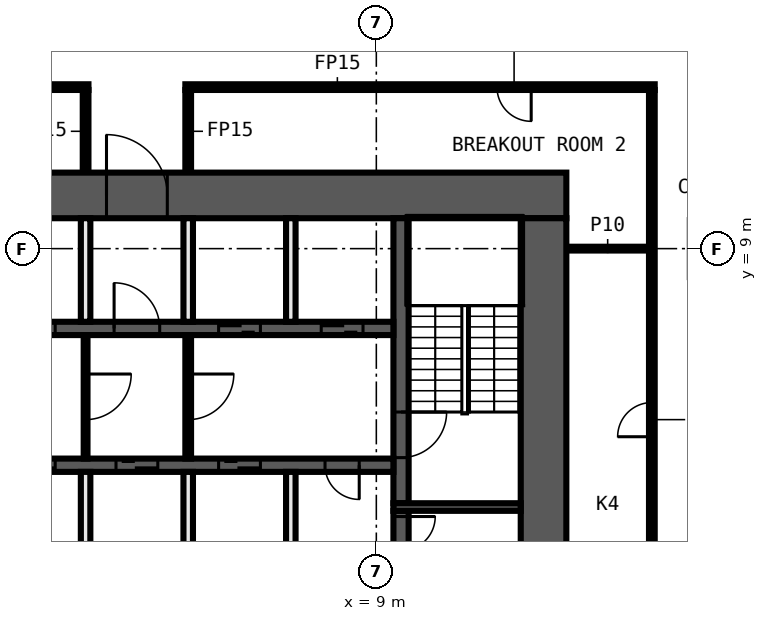
"""IFC4 building model, lengths in metres.
Left out: names, types, materials, properties, quantities, classifications, styles, units other than length and angle.
Written with IfcOpenShell. Run it as: python <this file> out.ifc"""

import sys

from ifc_helpers import new_model, si_unit, direction, frame, frame_2d, origin, place, context, subcontext, project, spatial, rectangle, extrude, element, fill, save


model = new_model("IFC4")
c1 = context("Model", 3, precision=1e-05, world=origin(), true_north=direction((0.0, 1.0)))
c2 = subcontext(c1, "Body", "Model", "MODEL_VIEW")
j1 = project(units=[si_unit("LENGTHUNIT", "METRE"), si_unit("PLANEANGLEUNIT", "RADIAN")], contexts=[c1])
p1 = place(None, origin())
s1 = spatial("IfcSite", under=j1, at=p1, CompositionType="ELEMENT")
p2 = place(p1, origin())
s2 = spatial("IfcBuilding", under=s1, at=p2, CompositionType="ELEMENT")
p3 = place(p2, frame((0.0, 0.0, 77.3)))
s3 = spatial("IfcBuildingStorey", under=s2, at=p3, CompositionType="ELEMENT", Elevation=77.3)
p4 = place(p3, frame((14.0, 9.0, 0.0), z_axis=(0.0, 0.0, 1.0), x_axis=(1.0, 0.0, 0.0)))
e1 = element("IfcWall", 1, at=p4, inside=s3, PredefinedType="PARTITIONING", context=c2, shape_type="SweptSolid", body=[
    extrude(rectangle(XDim=2.175, YDim=0.1, at=frame_2d((1.087, 0.0))), origin(), (0.0, 0.0, 1.0), 3.3),
])
p5 = place(p3, frame((1.425, 13.25, 0.0), z_axis=(0.0, 0.0, 1.0), x_axis=(-1.0, 0.0, 0.0)))
e2 = element("IfcWall", 2, at=p5, inside=s3, PredefinedType="PARTITIONING", context=c2, shape_type="SweptSolid", body=[
    extrude(rectangle(XDim=17.75, YDim=0.15, at=frame_2d((8.875, 0.0))), origin(), (0.0, 0.0, 1.0), 3.3),
])
p6 = place(p5, frame((7.725, 0.0, 0.0)))
e3 = element("IfcOpeningElement", 3, at=p6, cuts=e2, PredefinedType="OPENING", context=c2, shape_type="SweptSolid", body=[
    extrude(rectangle(XDim=0.9, YDim=2.1, at=frame_2d((0.45, 1.05))), frame((0.0, 0.085, 0.0), z_axis=(0.0, -1.0, 0.0), x_axis=(1.0, 0.0, 0.0)), (0.0, 0.0, 1.0), 0.17),
])
p7 = place(p5, frame((13.6, 0.0, 0.0)))
e4 = element("IfcOpeningElement", 4, at=p7, cuts=e2, PredefinedType="OPENING", context=c2, shape_type="SweptSolid", body=[
    extrude(rectangle(XDim=0.9, YDim=2.1, at=frame_2d((0.45, 1.05))), frame((0.0, 0.085, 0.0), z_axis=(0.0, -1.0, 0.0), x_axis=(1.0, 0.0, 0.0)), (0.0, 0.0, 1.0), 0.17),
])
p8 = place(p3, frame((16.325, 13.25, 0.0), z_axis=(0.0, 0.0, 1.0), x_axis=(-1.0, 0.0, 0.0)))
e5 = element("IfcWall", 5, at=p8, inside=s3, PredefinedType="PARTITIONING", context=c2, shape_type="SweptSolid", body=[
    extrude(rectangle(XDim=12.35, YDim=0.15, at=frame_2d((6.175, 0.0))), origin(), (0.0, 0.0, 1.0), 3.3),
])
p9 = place(p8, frame((3.25, 0.0, 0.0)))
e6 = element("IfcOpeningElement", 6, at=p9, cuts=e5, PredefinedType="OPENING", context=c2, shape_type="SweptSolid", body=[
    extrude(rectangle(XDim=0.9, YDim=2.1, at=frame_2d((0.45, 1.05))), frame((0.0, 0.085, 0.0), z_axis=(0.0, -1.0, 0.0), x_axis=(1.0, 0.0, 0.0)), (0.0, 0.0, 1.0), 0.17),
])
p10 = place(p3, frame((16.25, -13.175, 0.0), z_axis=(0.0, 0.0, 1.0), x_axis=(0.0, 1.0, 0.0)))
e7 = element("IfcWall", 7, at=p10, inside=s3, PredefinedType="PARTITIONING", context=c2, shape_type="SweptSolid", body=[
    extrude(rectangle(XDim=26.35, YDim=0.15, at=frame_2d((13.175, 0.0))), origin(), (0.0, 0.0, 1.0), 3.3),
])
p11 = place(p10, frame((17.225, 0.0, 0.0)))
e8 = element("IfcOpeningElement", 8, at=p11, cuts=e7, PredefinedType="OPENING", context=c2, shape_type="SweptSolid", body=[
    extrude(rectangle(XDim=0.9, YDim=2.1, at=frame_2d((0.45, 1.05))), frame((0.0, 0.085, 0.0), z_axis=(0.0, -1.0, 0.0), x_axis=(1.0, 0.0, 0.0)), (0.0, 0.0, 1.0), 0.17),
])
for number, where, z_axis, x_axis in (
    (9, (4.05, 11.0, 0.0), (0.0, 0.0, 1.0), (0.0, 1.0, 0.0)),
    (10, (1.35, 11.0, 0.0), (0.0, 0.0, 1.0), (0.0, 1.0, 0.0)),
):
    element("IfcWall", number, at=place(p3, frame(where, z_axis=z_axis, x_axis=x_axis)), inside=s3, PredefinedType="PARTITIONING", context=c2, shape_type="SweptSolid", body=[
        extrude(rectangle(XDim=2.175, YDim=0.15, at=frame_2d((1.087, 0.0))), origin(), (0.0, 0.0, 1.0), 3.3),
    ])
p12 = place(p3, frame((-14.0, 10.4, 0.0), z_axis=(0.0, 0.0, 1.0), x_axis=(1.0, 0.0, 0.0)))
e11 = element("IfcWall", 11, at=p12, inside=s3, PredefinedType="SHEAR", context=c2, shape_type="SweptSolid", body=[
    extrude(rectangle(XDim=28.0, YDim=1.2, at=frame_2d((14.0, 0.0))), origin(), (0.0, 0.0, 1.0), 3.3),
])
p13 = place(p12, frame((15.9, 0.0, 0.0)))
e12 = element("IfcOpeningElement", 12, at=p13, cuts=e11, PredefinedType="OPENING", context=c2, shape_type="SweptSolid", body=[
    extrude(rectangle(XDim=1.6, YDim=2.1, at=frame_2d((0.8, 1.05))), frame((0.0, 0.61, 0.0), z_axis=(0.0, -1.0, 0.0), x_axis=(1.0, 0.0, 0.0)), (0.0, 0.0, 1.0), 1.22),
])
p14 = place(p3, frame((13.4, 9.8, 0.0), z_axis=(0.0, 0.0, 1.0), x_axis=(0.0, -1.0, 0.0)))
e13 = element("IfcWall", 13, at=p14, inside=s3, PredefinedType="SHEAR", context=c2, shape_type="SweptSolid", body=[
    extrude(rectangle(XDim=19.6, YDim=1.2, at=frame_2d((9.8, 0.0))), origin(), (0.0, 0.0, 1.0), 3.3),
])
p15 = place(p3, frame((9.65, 2.1, 0.0), z_axis=(0.0, 0.0, 1.0), x_axis=(0.0, -1.0, 0.0)))
e14 = element("IfcWall", 14, at=p15, inside=s3, PredefinedType="SHEAR", context=c2, shape_type="SweptSolid", body=[
    extrude(rectangle(XDim=4.2, YDim=0.4, at=frame_2d((2.1, 0.0))), origin(), (0.0, 0.0, 1.0), 3.3),
])
p16 = place(p15, frame((0.15, 0.0, 0.0)))
e15 = element("IfcOpeningElement", 15, at=p16, cuts=e14, PredefinedType="OPENING", context=c2, shape_type="SweptSolid", body=[
    extrude(rectangle(XDim=0.9, YDim=2.1, at=frame_2d((0.45, 1.05))), frame((0.0, 0.21, 0.0), z_axis=(0.0, -1.0, 0.0), x_axis=(1.0, 0.0, 0.0)), (0.0, 0.0, 1.0), 0.42),
])
p17 = place(p3, frame((9.65, 9.8, 0.0), z_axis=(0.0, 0.0, 1.0), x_axis=(0.0, -1.0, 0.0)))
e16 = element("IfcWall", 16, at=p17, inside=s3, PredefinedType="SHEAR", context=c2, shape_type="SweptSolid", body=[
    extrude(rectangle(XDim=7.5, YDim=0.4, at=frame_2d((3.75, 0.0))), origin(), (0.0, 0.0, 1.0), 3.3),
])
p18 = place(p17, frame((5.1, 0.0, 0.0)))
e17 = element("IfcOpeningElement", 17, at=p18, cuts=e16, PredefinedType="OPENING", context=c2, shape_type="SweptSolid", body=[
    extrude(rectangle(XDim=1.2, YDim=2.1, at=frame_2d((0.6, 1.05))), frame((0.0, 0.21, 0.0), z_axis=(0.0, -1.0, 0.0), x_axis=(1.0, 0.0, 0.0)), (0.0, 0.0, 1.0), 0.42),
])
p19 = place(p3, frame((9.45, 2.2, 0.0), z_axis=(0.0, 0.0, 1.0), x_axis=(1.0, 0.0, 0.0)))
e18 = element("IfcWall", 18, at=p19, inside=s3, PredefinedType="SHEAR", context=c2, shape_type="SweptSolid", body=[
    extrude(rectangle(XDim=3.35, YDim=0.2, at=frame_2d((1.675, 0.0))), origin(), (0.0, 0.0, 1.0), 3.3),
])
p20 = place(p3, frame((-9.45, 6.9, 0.0), z_axis=(0.0, 0.0, 1.0), x_axis=(1.0, 0.0, 0.0)))
e19 = element("IfcWall", 19, at=p20, inside=s3, PredefinedType="SHEAR", context=c2, shape_type="SweptSolid", body=[
    extrude(rectangle(XDim=18.9, YDim=0.35, at=frame_2d((9.45, 0.0))), origin(), (0.0, 0.0, 1.0), 3.3),
])
p21 = place(p20, frame((0.8, 0.0, 0.0)))
e20 = element("IfcOpeningElement", 20, at=p21, cuts=e19, PredefinedType="OPENING", context=c2, shape_type="SweptSolid", body=[
    extrude(rectangle(XDim=1.1, YDim=2.1, at=frame_2d((0.55, 1.05))), frame((0.0, 0.185, 0.0), z_axis=(0.0, -1.0, 0.0), x_axis=(1.0, 0.0, 0.0)), (0.0, 0.0, 1.0), 0.37),
])
p22 = place(p20, frame((3.5, 0.0, 0.0)))
e21 = element("IfcOpeningElement", 21, at=p22, cuts=e19, PredefinedType="OPENING", context=c2, shape_type="SweptSolid", body=[
    extrude(rectangle(XDim=1.1, YDim=2.1, at=frame_2d((0.55, 1.05))), frame((0.0, 0.185, 0.0), z_axis=(0.0, -1.0, 0.0), x_axis=(1.0, 0.0, 0.0)), (0.0, 0.0, 1.0), 0.37),
])
p23 = place(p20, frame((6.2, 0.0, 0.0)))
e22 = element("IfcOpeningElement", 22, at=p23, cuts=e19, PredefinedType="OPENING", context=c2, shape_type="SweptSolid", body=[
    extrude(rectangle(XDim=1.1, YDim=2.1, at=frame_2d((0.55, 1.05))), frame((0.0, 0.185, 0.0), z_axis=(0.0, -1.0, 0.0), x_axis=(1.0, 0.0, 0.0)), (0.0, 0.0, 1.0), 0.37),
])
p24 = place(p20, frame((8.9, 0.0, 0.0)))
e23 = element("IfcOpeningElement", 23, at=p24, cuts=e19, PredefinedType="OPENING", context=c2, shape_type="SweptSolid", body=[
    extrude(rectangle(XDim=1.1, YDim=2.1, at=frame_2d((0.55, 1.05))), frame((0.0, 0.185, 0.0), z_axis=(0.0, -1.0, 0.0), x_axis=(1.0, 0.0, 0.0)), (0.0, 0.0, 1.0), 0.37),
])
p25 = place(p20, frame((11.55, 0.0, 0.0)))
e24 = element("IfcOpeningElement", 24, at=p25, cuts=e19, PredefinedType="OPENING", context=c2, shape_type="SweptSolid", body=[
    extrude(rectangle(XDim=1.2, YDim=2.1, at=frame_2d((0.6, 1.05))), frame((0.0, 0.185, 0.0), z_axis=(0.0, -1.0, 0.0), x_axis=(1.0, 0.0, 0.0)), (0.0, 0.0, 1.0), 0.37),
])
p26 = place(p20, frame((14.3, 0.0, 0.0)))
e25 = element("IfcOpeningElement", 25, at=p26, cuts=e19, PredefinedType="OPENING", context=c2, shape_type="SweptSolid", body=[
    extrude(rectangle(XDim=1.1, YDim=2.1, at=frame_2d((0.55, 1.05))), frame((0.0, 0.185, 0.0), z_axis=(0.0, -1.0, 0.0), x_axis=(1.0, 0.0, 0.0)), (0.0, 0.0, 1.0), 0.37),
])
p27 = place(p20, frame((17.0, 0.0, 0.0)))
e26 = element("IfcOpeningElement", 26, at=p27, cuts=e19, PredefinedType="OPENING", context=c2, shape_type="SweptSolid", body=[
    extrude(rectangle(XDim=1.1, YDim=2.1, at=frame_2d((0.55, 1.05))), frame((0.0, 0.185, 0.0), z_axis=(0.0, -1.0, 0.0), x_axis=(1.0, 0.0, 0.0)), (0.0, 0.0, 1.0), 0.37),
])
p28 = place(p3, frame((9.45, 3.3, 0.0), z_axis=(0.0, 0.0, 1.0), x_axis=(-1.0, 0.0, 0.0)))
e27 = element("IfcWall", 27, at=p28, inside=s3, PredefinedType="SHEAR", context=c2, shape_type="SweptSolid", body=[
    extrude(rectangle(XDim=18.9, YDim=0.35, at=frame_2d((9.45, 0.0))), origin(), (0.0, 0.0, 1.0), 3.3),
])
p29 = place(p28, frame((17.0, 0.0, 0.0)))
e28 = element("IfcOpeningElement", 28, at=p29, cuts=e27, PredefinedType="OPENING", context=c2, shape_type="SweptSolid", body=[
    extrude(rectangle(XDim=1.1, YDim=2.1, at=frame_2d((0.55, 1.05))), frame((0.0, 0.185, 0.0), z_axis=(0.0, -1.0, 0.0), x_axis=(1.0, 0.0, 0.0)), (0.0, 0.0, 1.0), 0.37),
])
p30 = place(p28, frame((14.3, 0.0, 0.0)))
e29 = element("IfcOpeningElement", 29, at=p30, cuts=e27, PredefinedType="OPENING", context=c2, shape_type="SweptSolid", body=[
    extrude(rectangle(XDim=1.1, YDim=2.1, at=frame_2d((0.55, 1.05))), frame((0.0, 0.185, 0.0), z_axis=(0.0, -1.0, 0.0), x_axis=(1.0, 0.0, 0.0)), (0.0, 0.0, 1.0), 0.37),
])
p31 = place(p28, frame((11.6, 0.0, 0.0)))
e30 = element("IfcOpeningElement", 30, at=p31, cuts=e27, PredefinedType="OPENING", context=c2, shape_type="SweptSolid", body=[
    extrude(rectangle(XDim=1.1, YDim=2.1, at=frame_2d((0.55, 1.05))), frame((0.0, 0.185, 0.0), z_axis=(0.0, -1.0, 0.0), x_axis=(1.0, 0.0, 0.0)), (0.0, 0.0, 1.0), 0.37),
])
p32 = place(p28, frame((8.9, 0.0, 0.0)))
e31 = element("IfcOpeningElement", 31, at=p32, cuts=e27, PredefinedType="OPENING", context=c2, shape_type="SweptSolid", body=[
    extrude(rectangle(XDim=1.1, YDim=2.1, at=frame_2d((0.55, 1.05))), frame((0.0, 0.185, 0.0), z_axis=(0.0, -1.0, 0.0), x_axis=(1.0, 0.0, 0.0)), (0.0, 0.0, 1.0), 0.37),
])
p33 = place(p28, frame((6.2, 0.0, 0.0)))
e32 = element("IfcOpeningElement", 32, at=p33, cuts=e27, PredefinedType="OPENING", context=c2, shape_type="SweptSolid", body=[
    extrude(rectangle(XDim=1.1, YDim=2.1, at=frame_2d((0.55, 1.05))), frame((0.0, 0.185, 0.0), z_axis=(0.0, -1.0, 0.0), x_axis=(1.0, 0.0, 0.0)), (0.0, 0.0, 1.0), 0.37),
])
p34 = place(p28, frame((3.5, 0.0, 0.0)))
e33 = element("IfcOpeningElement", 33, at=p34, cuts=e27, PredefinedType="OPENING", context=c2, shape_type="SweptSolid", body=[
    extrude(rectangle(XDim=1.1, YDim=2.1, at=frame_2d((0.55, 1.05))), frame((0.0, 0.185, 0.0), z_axis=(0.0, -1.0, 0.0), x_axis=(1.0, 0.0, 0.0)), (0.0, 0.0, 1.0), 0.37),
])
p35 = place(p28, frame((0.9, 0.0, 0.0)))
e34 = element("IfcOpeningElement", 34, at=p35, cuts=e27, PredefinedType="OPENING", context=c2, shape_type="SweptSolid", body=[
    extrude(rectangle(XDim=0.9, YDim=2.1, at=frame_2d((0.45, 1.05))), frame((0.0, 0.185, 0.0), z_axis=(0.0, -1.0, 0.0), x_axis=(1.0, 0.0, 0.0)), (0.0, 0.0, 1.0), 0.37),
])
for number, where, z_axis, x_axis in (
    (35, (6.75, 0.4, 0.0), (0.0, 0.0, 1.0), (0.0, 1.0, 0.0)),
    (36, (6.75, 7.075, 0.0), (0.0, 0.0, 1.0), (0.0, 1.0, 0.0)),
):
    element("IfcWall", number, at=place(p3, frame(where, z_axis=z_axis, x_axis=x_axis)), inside=s3, PredefinedType="SOLIDWALL", context=c2, shape_type="SweptSolid", body=[
        extrude(rectangle(XDim=2.725, YDim=0.25, at=frame_2d((1.363, 0.0))), origin(), (0.0, 0.0, 1.0), 3.3),
    ])
p36 = place(p3, frame((4.05, 6.725, 0.0), z_axis=(0.0, 0.0, 1.0), x_axis=(0.0, -1.0, 0.0)))
e37 = element("IfcWall", 37, at=p36, inside=s3, PredefinedType="PARTITIONING", context=c2, shape_type="SweptSolid", body=[
    extrude(rectangle(XDim=3.25, YDim=0.15, at=frame_2d((1.625, 0.0))), origin(), (0.0, 0.0, 1.0), 3.3),
])
p37 = place(p36, frame((1.025, 0.0, 0.0)))
e38 = element("IfcOpeningElement", 38, at=p37, cuts=e37, PredefinedType="OPENING", context=c2, shape_type="SweptSolid", body=[
    extrude(rectangle(XDim=1.2, YDim=2.1, at=frame_2d((0.6, 1.05))), frame((0.0, 0.085, 0.0), z_axis=(0.0, -1.0, 0.0), x_axis=(1.0, 0.0, 0.0)), (0.0, 0.0, 1.0), 0.17),
])
for number, where, z_axis, x_axis in (
    (39, (4.05, 0.4, 0.0), (0.0, 0.0, 1.0), (0.0, 1.0, 0.0)),
    (40, (4.05, 7.075, 0.0), (0.0, 0.0, 1.0), (0.0, 1.0, 0.0)),
):
    element("IfcWall", number, at=place(p3, frame(where, z_axis=z_axis, x_axis=x_axis)), inside=s3, PredefinedType="SOLIDWALL", context=c2, shape_type="SweptSolid", body=[
        extrude(rectangle(XDim=2.725, YDim=0.25, at=frame_2d((1.363, 0.0))), origin(), (0.0, 0.0, 1.0), 3.3),
    ])
p38 = place(p3, frame((1.35, 6.725, 0.0), z_axis=(0.0, 0.0, 1.0), x_axis=(0.0, -1.0, 0.0)))
e41 = element("IfcWall", 41, at=p38, inside=s3, PredefinedType="PARTITIONING", context=c2, shape_type="SweptSolid", body=[
    extrude(rectangle(XDim=3.25, YDim=0.1, at=frame_2d((1.625, 0.0))), origin(), (0.0, 0.0, 1.0), 3.3),
])
p39 = place(p38, frame((1.025, 0.0, 0.0)))
e42 = element("IfcOpeningElement", 42, at=p39, cuts=e41, PredefinedType="OPENING", context=c2, shape_type="SweptSolid", body=[
    extrude(rectangle(XDim=1.2, YDim=2.1, at=frame_2d((0.6, 1.05))), frame((0.0, 0.06, 0.0), z_axis=(0.0, -1.0, 0.0), x_axis=(1.0, 0.0, 0.0)), (0.0, 0.0, 1.0), 0.12),
])
for number, where, z_axis, x_axis in (
    (43, (1.35, 0.4, 0.0), (0.0, 0.0, 1.0), (0.0, 1.0, 0.0)),
    (44, (1.35, 7.075, 0.0), (0.0, 0.0, 1.0), (0.0, 1.0, 0.0)),
):
    element("IfcWall", number, at=place(p3, frame(where, z_axis=z_axis, x_axis=x_axis)), inside=s3, PredefinedType="SOLIDWALL", context=c2, shape_type="SweptSolid", body=[
        extrude(rectangle(XDim=2.725, YDim=0.25, at=frame_2d((1.363, 0.0))), origin(), (0.0, 0.0, 1.0), 3.3),
    ])
p40 = place(p11, origin())
e45 = element("IfcDoor", 45, at=p40, inside=s3, OperationType="SINGLE_SWING_LEFT", PredefinedType="DOOR", context=c2, shape_type="SweptSolid", body=[
    extrude(rectangle(XDim=0.9, YDim=2.1, at=frame_2d((0.45, 1.05))), frame((0.0, 0.025, 0.0), z_axis=(0.0, -1.0, 0.0), x_axis=(1.0, 0.0, 0.0)), (0.0, 0.0, 1.0), 0.05),
])
fill(e8, e45)
p41 = place(p9, origin())
e46 = element("IfcDoor", 46, at=p41, inside=s3, OperationType="SINGLE_SWING_RIGHT", PredefinedType="DOOR", context=c2, shape_type="SweptSolid", body=[
    extrude(rectangle(XDim=0.9, YDim=2.1, at=frame_2d((0.45, 1.05))), frame((0.0, 0.025, 0.0), z_axis=(0.0, -1.0, 0.0), x_axis=(1.0, 0.0, 0.0)), (0.0, 0.0, 1.0), 0.05),
])
fill(e6, e46)
p42 = place(p16, origin())
e47 = element("IfcDoor", 47, at=p42, inside=s3, OperationType="SINGLE_SWING_RIGHT", PredefinedType="DOOR", context=c2, shape_type="SweptSolid", body=[
    extrude(rectangle(XDim=0.9, YDim=2.1, at=frame_2d((0.45, 1.05))), frame((0.0, 0.025, 0.0), z_axis=(0.0, -1.0, 0.0), x_axis=(1.0, 0.0, 0.0)), (0.0, 0.0, 1.0), 0.05),
])
fill(e15, e47)
p43 = place(p24, origin())
e48 = element("IfcDoor", 48, at=p43, inside=s3, OperationType="DOUBLE_DOOR_SLIDING", PredefinedType="DOOR", context=c2, shape_type="SweptSolid", body=[
    extrude(rectangle(XDim=1.1, YDim=2.1, at=frame_2d((0.55, 1.05))), frame((0.0, 0.025, 0.0), z_axis=(0.0, -1.0, 0.0), x_axis=(1.0, 0.0, 0.0)), (0.0, 0.0, 1.0), 0.05),
])
fill(e23, e48)
p44 = place(p13, origin())
e49 = element("IfcDoor", 49, at=p44, inside=s3, OperationType="DOUBLE_DOOR_SINGLE_SWING", PredefinedType="DOOR", context=c2, shape_type="SweptSolid", body=[
    extrude(rectangle(XDim=1.6, YDim=2.1, at=frame_2d((0.8, 1.05))), frame((0.0, 0.025, 0.0), z_axis=(0.0, -1.0, 0.0), x_axis=(1.0, 0.0, 0.0)), (0.0, 0.0, 1.0), 0.05),
])
fill(e12, e49)
p45 = place(p25, origin())
e50 = element("IfcDoor", 50, at=p45, inside=s3, OperationType="SINGLE_SWING_LEFT", PredefinedType="DOOR", context=c2, shape_type="SweptSolid", body=[
    extrude(rectangle(XDim=1.2, YDim=2.1, at=frame_2d((0.6, 1.05))), frame((0.0, 0.025, 0.0), z_axis=(0.0, -1.0, 0.0), x_axis=(1.0, 0.0, 0.0)), (0.0, 0.0, 1.0), 0.05),
])
fill(e24, e50)
p46 = place(p26, origin())
e51 = element("IfcDoor", 51, at=p46, inside=s3, OperationType="DOUBLE_DOOR_SLIDING", PredefinedType="DOOR", context=c2, shape_type="SweptSolid", body=[
    extrude(rectangle(XDim=1.1, YDim=2.1, at=frame_2d((0.55, 1.05))), frame((0.0, 0.025, 0.0), z_axis=(0.0, -1.0, 0.0), x_axis=(1.0, 0.0, 0.0)), (0.0, 0.0, 1.0), 0.05),
])
fill(e25, e51)
p47 = place(p27, origin())
e52 = element("IfcDoor", 52, at=p47, inside=s3, OperationType="DOUBLE_DOOR_SLIDING", PredefinedType="DOOR", context=c2, shape_type="SweptSolid", body=[
    extrude(rectangle(XDim=1.1, YDim=2.1, at=frame_2d((0.55, 1.05))), frame((0.0, 0.025, 0.0), z_axis=(0.0, -1.0, 0.0), x_axis=(1.0, 0.0, 0.0)), (0.0, 0.0, 1.0), 0.05),
])
fill(e26, e52)
p48 = place(p32, origin())
e53 = element("IfcDoor", 53, at=p48, inside=s3, OperationType="DOUBLE_DOOR_SLIDING", PredefinedType="DOOR", context=c2, shape_type="SweptSolid", body=[
    extrude(rectangle(XDim=1.1, YDim=2.1, at=frame_2d((0.55, 1.05))), frame((0.0, 0.025, 0.0), z_axis=(0.0, -1.0, 0.0), x_axis=(1.0, 0.0, 0.0)), (0.0, 0.0, 1.0), 0.05),
])
fill(e31, e53)
p49 = place(p33, origin())
e54 = element("IfcDoor", 54, at=p49, inside=s3, OperationType="DOUBLE_DOOR_SLIDING", PredefinedType="DOOR", context=c2, shape_type="SweptSolid", body=[
    extrude(rectangle(XDim=1.1, YDim=2.1, at=frame_2d((0.55, 1.05))), frame((0.0, 0.025, 0.0), z_axis=(0.0, -1.0, 0.0), x_axis=(1.0, 0.0, 0.0)), (0.0, 0.0, 1.0), 0.05),
])
fill(e32, e54)
p50 = place(p34, origin())
e55 = element("IfcDoor", 55, at=p50, inside=s3, OperationType="DOUBLE_DOOR_SLIDING", PredefinedType="DOOR", context=c2, shape_type="SweptSolid", body=[
    extrude(rectangle(XDim=1.1, YDim=2.1, at=frame_2d((0.55, 1.05))), frame((0.0, 0.025, 0.0), z_axis=(0.0, -1.0, 0.0), x_axis=(1.0, 0.0, 0.0)), (0.0, 0.0, 1.0), 0.05),
])
fill(e33, e55)
p51 = place(p35, origin())
e56 = element("IfcDoor", 56, at=p51, inside=s3, OperationType="SINGLE_SWING_LEFT", PredefinedType="DOOR", context=c2, shape_type="SweptSolid", body=[
    extrude(rectangle(XDim=0.9, YDim=2.1, at=frame_2d((0.45, 1.05))), frame((0.0, 0.025, 0.0), z_axis=(0.0, -1.0, 0.0), x_axis=(1.0, 0.0, 0.0)), (0.0, 0.0, 1.0), 0.05),
])
fill(e34, e56)
p52 = place(p18, origin())
e57 = element("IfcDoor", 57, at=p52, inside=s3, OperationType="SINGLE_SWING_LEFT", PredefinedType="DOOR", context=c2, shape_type="SweptSolid", body=[
    extrude(rectangle(XDim=1.2, YDim=2.1, at=frame_2d((0.6, 1.05))), frame((0.0, 0.025, 0.0), z_axis=(0.0, -1.0, 0.0), x_axis=(1.0, 0.0, 0.0)), (0.0, 0.0, 1.0), 0.05),
])
fill(e17, e57)
p53 = place(p39, origin())
e58 = element("IfcDoor", 58, at=p53, inside=s3, OperationType="SINGLE_SWING_LEFT", PredefinedType="DOOR", context=c2, shape_type="SweptSolid", body=[
    extrude(rectangle(XDim=1.2, YDim=2.1, at=frame_2d((0.6, 1.05))), frame((0.0, 0.025, 0.0), z_axis=(0.0, -1.0, 0.0), x_axis=(1.0, 0.0, 0.0)), (0.0, 0.0, 1.0), 0.05),
])
fill(e42, e58)
p54 = place(p37, origin())
e59 = element("IfcDoor", 59, at=p54, inside=s3, OperationType="SINGLE_SWING_RIGHT", PredefinedType="DOOR", context=c2, shape_type="SweptSolid", body=[
    extrude(rectangle(XDim=1.2, YDim=2.1, at=frame_2d((0.6, 1.05))), frame((0.0, 0.025, 0.0), z_axis=(0.0, -1.0, 0.0), x_axis=(1.0, 0.0, 0.0)), (0.0, 0.0, 1.0), 0.05),
])
fill(e38, e59)
save(model, sys.argv[1])
